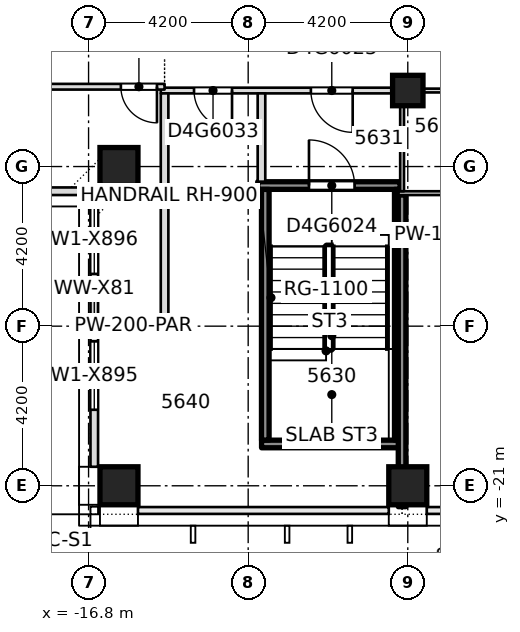
"""IFC4 building model, lengths in metres.
Left out: names, types, materials, properties, quantities, classifications, styles, units other than length and angle.
Written with IfcOpenShell. Run it as: python <this file> out.ifc"""

import sys

from ifc_helpers import new_model, si_unit, direction, frame, frame_2d, origin, origin_2d, place, context, subcontext, project, spatial, rectangle, extrude, element, fill, save


model = new_model("IFC4")
c1 = context("Model", 3, precision=1e-05, world=origin(), true_north=direction((0.0, 1.0)))
c2 = subcontext(c1, "Body", "Model", "MODEL_VIEW")
j1 = project(units=[si_unit("LENGTHUNIT", "METRE"), si_unit("PLANEANGLEUNIT", "RADIAN")], contexts=[c1])
p1 = place(None, origin())
s1 = spatial("IfcSite", under=j1, at=p1, CompositionType="ELEMENT")
p2 = place(p1, origin())
s2 = spatial("IfcBuilding", under=s1, at=p2, CompositionType="ELEMENT")
p3 = place(p2, frame((0.0, 0.0, 213.5)))
s3 = spatial("IfcBuildingStorey", under=s2, at=p3, CompositionType="ELEMENT", Elevation=213.5)
for number, where, z_axis, x_axis in (
    (1, (-16.0, -21.0, -0.4), (0.0, 0.0, 1.0), (1.0, 0.0, 0.0)),
    (2, (-8.4, -21.0, -0.4), (0.0, 0.0, 1.0), (1.0, 0.0, 0.0)),
    (3, (-16.0, -12.6, -0.4), (0.0, 0.0, 1.0), (1.0, 0.0, 0.0)),
):
    element("IfcColumn", number, at=place(p3, frame(where, z_axis=z_axis, x_axis=x_axis)), inside=s3, PredefinedType="COLUMN", context=c2, shape_type="SweptSolid", body=[
        extrude(rectangle(XDim=1.0, YDim=1.0, at=origin_2d()), origin(), (0.0, 0.0, 1.0), 3.85),
    ])
p4 = place(p3, frame((-8.4, -10.6, -0.4), z_axis=(0.0, 0.0, 1.0), x_axis=(1.0, 0.0, 0.0)))
e4 = element("IfcColumn", 4, at=p4, inside=s3, PredefinedType="COLUMN", context=c2, shape_type="SweptSolid", body=[
    extrude(rectangle(XDim=0.8, YDim=0.8, at=origin_2d()), origin(), (0.0, 0.0, 1.0), 3.85),
])
p5 = place(p3, frame((-12.248, -19.9, 0.0), z_axis=(0.0, 0.0, 1.0), x_axis=(1.0, 0.0, 0.0)))
e5 = element("IfcWall", 5, at=p5, inside=s3, PredefinedType="SOLIDWALL", context=c2, shape_type="SweptSolid", body=[
    extrude(rectangle(XDim=3.696, YDim=0.2, at=frame_2d((1.848, 0.0))), origin(), (0.0, 0.0, 1.0), 3.0),
])
p6 = place(p3, frame((-16.55, -16.8, 0.0), z_axis=(0.0, 0.0, 1.0), x_axis=(1.0, 0.0, 0.0)))
e6 = element("IfcWall", 6, at=p6, inside=s3, PredefinedType="PARTITIONING", context=c2, shape_type="SweptSolid", body=[
    extrude(rectangle(XDim=1.848, YDim=0.2, at=frame_2d((0.924, 0.0))), origin(), (0.0, 0.0, 1.0), 3.0),
])
p7 = place(p3, frame((-8.65, -13.3, 0.0), z_axis=(0.0, 0.0, 1.0), x_axis=(1.0, 0.0, 0.0)))
e7 = element("IfcWall", 7, at=p7, inside=s3, PredefinedType="PARTITIONING", context=c2, shape_type="SweptSolid", body=[
    extrude(rectangle(XDim=2.848, YDim=0.1, at=frame_2d((1.424, 0.0))), origin(), (0.0, 0.0, 1.0), 3.0),
])
p8 = place(p7, frame((1.75, 0.0, 0.0)))
e8 = element("IfcOpeningElement", 8, at=p8, cuts=e7, PredefinedType="OPENING", context=c2, shape_type="SweptSolid", body=[
    extrude(rectangle(XDim=0.85, YDim=2.1, at=frame_2d((0.425, 1.05))), frame((0.0, 0.06, 0.0), z_axis=(0.0, -1.0, 0.0), x_axis=(1.0, 0.0, 0.0)), (0.0, 0.0, 1.0), 0.12),
])
p9 = place(p3, frame((-12.348, -13.1, 0.0), z_axis=(0.0, 0.0, 1.0), x_axis=(1.0, 0.0, 0.0)))
e9 = element("IfcWall", 9, at=p9, inside=s3, PredefinedType="SOLIDWALL", context=c2, shape_type="SweptSolid", body=[
    extrude(rectangle(XDim=3.746, YDim=0.2, at=frame_2d((1.873, 0.0))), origin(), (0.0, 0.0, 1.0), 3.0),
])
p10 = place(p9, frame((1.348, 0.0, 0.0)))
e10 = element("IfcOpeningElement", 10, at=p10, cuts=e9, PredefinedType="OPENING", context=c2, shape_type="SweptSolid", body=[
    extrude(rectangle(XDim=1.2, YDim=2.1, at=frame_2d((0.6, 1.05))), frame((0.0, 0.11, 0.0), z_axis=(0.0, -1.0, 0.0), x_axis=(1.0, 0.0, 0.0)), (0.0, 0.0, 1.0), 0.22),
])
p11 = place(p3, frame((-14.9, -10.6, 0.0), z_axis=(0.0, 0.0, 1.0), x_axis=(1.0, 0.0, 0.0)))
e11 = element("IfcWall", 11, at=p11, inside=s3, PredefinedType="PARTITIONING", context=c2, shape_type="SweptSolid", body=[
    extrude(rectangle(XDim=6.4, YDim=0.15, at=frame_2d((3.2, 0.0))), origin(), (0.0, 0.0, 1.0), 3.0),
])
p12 = place(p11, frame((3.95, 0.0, 0.0)))
e12 = element("IfcOpeningElement", 12, at=p12, cuts=e11, PredefinedType="OPENING", context=c2, shape_type="SweptSolid", body=[
    extrude(rectangle(XDim=1.1, YDim=2.1, at=frame_2d((0.55, 1.05))), frame((0.0, 0.085, 0.0), z_axis=(0.0, -1.0, 0.0), x_axis=(1.0, 0.0, 0.0)), (0.0, 0.0, 1.0), 0.17),
])
p13 = place(p11, frame((0.875, 0.0, 0.0)))
e13 = element("IfcOpeningElement", 13, at=p13, cuts=e11, PredefinedType="OPENING", context=c2, shape_type="SweptSolid", body=[
    extrude(rectangle(XDim=1.0, YDim=2.1, at=frame_2d((0.5, 1.05))), frame((0.0, 0.085, 0.0), z_axis=(0.0, -1.0, 0.0), x_axis=(1.0, 0.0, 0.0)), (0.0, 0.0, 1.0), 0.17),
])
p14 = place(p3, frame((-8.6, -10.6, 0.0), z_axis=(0.0, 0.0, 1.0), x_axis=(1.0, 0.0, 0.0)))
e14 = element("IfcWall", 14, at=p14, inside=s3, PredefinedType="PARTITIONING", context=c2, shape_type="SweptSolid", body=[
    extrude(rectangle(XDim=2.8, YDim=0.1, at=frame_2d((1.4, 0.0))), origin(), (0.0, 0.0, 1.0), 3.0),
])
p15 = place(p3, frame((-25.75, -10.5, 0.0), z_axis=(0.0, 0.0, 1.0), x_axis=(1.0, 0.0, 0.0)))
e15 = element("IfcWall", 15, at=p15, inside=s3, PredefinedType="PARTITIONING", context=c2, shape_type="SweptSolid", body=[
    extrude(rectangle(XDim=10.95, YDim=0.15, at=frame_2d((5.475, 0.0))), origin(), (0.0, 0.0, 1.0), 3.0),
])
p16 = place(p15, frame((9.8, 0.0, 0.0)))
e16 = element("IfcOpeningElement", 16, at=p16, cuts=e15, PredefinedType="OPENING", context=c2, shape_type="SweptSolid", body=[
    extrude(rectangle(XDim=0.95, YDim=2.1, at=frame_2d((0.475, 1.05))), frame((0.0, 0.085, 0.0), z_axis=(0.0, -1.0, 0.0), x_axis=(1.0, 0.0, 0.0)), (0.0, 0.0, 1.0), 0.17),
])
p17 = place(p3, frame((-14.8, -16.698, 0.0), z_axis=(0.0, 0.0, 1.0), x_axis=(0.0, 1.0, 0.0)))
e17 = element("IfcWall", 17, at=p17, inside=s3, PredefinedType="PARTITIONING", context=c2, shape_type="SweptSolid", body=[
    extrude(rectangle(XDim=6.023, YDim=0.2, at=frame_2d((3.011, 0.0))), origin(), (0.0, 0.0, 1.0), 3.0),
])
p18 = place(p3, frame((-12.25, -12.998, 0.0), z_axis=(0.0, 0.0, 1.0), x_axis=(0.0, 1.0, 0.0)))
e18 = element("IfcWall", 18, at=p18, inside=s3, PredefinedType="PARTITIONING", context=c2, shape_type="SweptSolid", body=[
    extrude(rectangle(XDim=2.323, YDim=0.2, at=frame_2d((1.162, 0.0))), origin(), (0.0, 0.0, 1.0), 3.0),
])
for number, where, z_axis, x_axis in (
    (19, (-12.15, -19.798, 0.0), (0.0, 0.0, 1.0), (0.0, 1.0, 0.0)),
    (20, (-8.65, -19.798, 0.0), (0.0, 0.0, 1.0), (0.0, 1.0, 0.0)),
):
    element("IfcWall", number, at=place(p3, frame(where, z_axis=z_axis, x_axis=x_axis)), inside=s3, PredefinedType="SOLIDWALL", context=c2, shape_type="SweptSolid", body=[
        extrude(rectangle(XDim=6.596, YDim=0.2, at=frame_2d((3.298, 0.0))), origin(), (0.0, 0.0, 1.0), 3.0),
    ])
p19 = place(p3, frame((-8.55, -13.25, 0.0), z_axis=(0.0, 0.0, 1.0), x_axis=(0.0, 1.0, 0.0)))
e21 = element("IfcWall", 21, at=p19, inside=s3, PredefinedType="PARTITIONING", context=c2, shape_type="SweptSolid", body=[
    extrude(rectangle(XDim=2.575, YDim=0.1, at=frame_2d((1.288, 0.0))), origin(), (0.0, 0.0, 1.0), 3.0),
])
p20 = place(p3, frame((-24.7, -13.25, 0.0), z_axis=(0.0, 0.0, 1.0), x_axis=(1.0, 0.0, 0.0)))
e22 = element("IfcWall", 22, at=p20, inside=s3, PredefinedType="STANDARD", context=c2, shape_type="SweptSolid", body=[
    extrude(rectangle(XDim=7.95, YDim=0.2, at=frame_2d((3.975, 0.0))), origin(), (0.0, 0.0, 1.0), 3.0),
])
p21 = place(p3, frame((-16.65, -13.35, 0.0), z_axis=(0.0, 0.0, 1.0), x_axis=(0.0, -1.0, 0.0)))
e23 = element("IfcWall", 23, at=p21, inside=s3, PredefinedType="STANDARD", context=c2, shape_type="SweptSolid", body=[
    extrude(rectangle(XDim=7.15, YDim=0.2, at=frame_2d((3.575, 0.0))), origin(), (0.0, 0.0, 1.0), 3.0),
])
p22 = place(p21, frame((3.85, 0.0, 0.2)))
e24 = element("IfcOpeningElement", 24, at=p22, cuts=e23, PredefinedType="OPENING", context=c2, shape_type="SweptSolid", body=[
    extrude(rectangle(XDim=1.8, YDim=2.65, at=frame_2d((0.9, 1.325))), frame((0.0, 0.11, 0.0), z_axis=(0.0, -1.0, 0.0), x_axis=(1.0, 0.0, 0.0)), (0.0, 0.0, 1.0), 0.22),
])
p23 = place(p21, frame((0.275, 0.0, 0.2)))
e25 = element("IfcOpeningElement", 25, at=p23, cuts=e23, PredefinedType="OPENING", context=c2, shape_type="SweptSolid", body=[
    extrude(rectangle(XDim=1.8, YDim=2.65, at=frame_2d((0.9, 1.325))), frame((0.0, 0.11, 0.0), z_axis=(0.0, -1.0, 0.0), x_axis=(1.0, 0.0, 0.0)), (0.0, 0.0, 1.0), 0.22),
])
p24 = place(p3, frame((-8.55, -21.55, 0.0), z_axis=(0.0, 0.0, 1.0), x_axis=(0.0, 1.0, 0.0)))
e26 = element("IfcWall", 26, at=p24, inside=s3, PredefinedType="SOLIDWALL", context=c2, shape_type="SweptSolid", body=[
    extrude(rectangle(XDim=8.2, YDim=0.2, at=frame_2d((4.1, 0.0))), origin(), (0.0, 0.0, 1.0), 3.0),
])
p25 = place(p16, origin())
e27 = element("IfcDoor", 27, at=p25, inside=s3, OperationType="SINGLE_SWING_RIGHT", PredefinedType="DOOR", context=c2, shape_type="SweptSolid", body=[
    extrude(rectangle(XDim=0.95, YDim=2.1, at=frame_2d((0.475, 1.05))), frame((0.0, 0.025, 0.0), z_axis=(0.0, -1.0, 0.0), x_axis=(1.0, 0.0, 0.0)), (0.0, 0.0, 1.0), 0.05),
])
fill(e16, e27)
p26 = place(p12, origin())
e28 = element("IfcDoor", 28, at=p26, inside=s3, OperationType="SINGLE_SWING_RIGHT", PredefinedType="DOOR", context=c2, shape_type="SweptSolid", body=[
    extrude(rectangle(XDim=1.1, YDim=2.1, at=frame_2d((0.55, 1.05))), frame((0.0, 0.025, 0.0), z_axis=(0.0, -1.0, 0.0), x_axis=(1.0, 0.0, 0.0)), (0.0, 0.0, 1.0), 0.05),
])
fill(e12, e28)
p27 = place(p10, origin())
e29 = element("IfcDoor", 29, at=p27, inside=s3, OperationType="SINGLE_SWING_RIGHT", PredefinedType="DOOR", context=c2, shape_type="SweptSolid", body=[
    extrude(rectangle(XDim=1.2, YDim=2.1, at=frame_2d((0.6, 1.05))), frame((0.0, 0.025, 0.0), z_axis=(0.0, -1.0, 0.0), x_axis=(1.0, 0.0, 0.0)), (0.0, 0.0, 1.0), 0.05),
])
fill(e10, e29)
p28 = place(p13, origin())
e30 = element("IfcDoor", 30, at=p28, inside=s3, OperationType="SINGLE_SWING_RIGHT", PredefinedType="DOOR", context=c2, shape_type="SweptSolid", body=[
    extrude(rectangle(XDim=1.0, YDim=2.1, at=frame_2d((0.5, 1.05))), frame((0.0, 0.025, 0.0), z_axis=(0.0, -1.0, 0.0), x_axis=(1.0, 0.0, 0.0)), (0.0, 0.0, 1.0), 0.05),
])
fill(e13, e30)
p29 = place(p22, origin())
e31 = element("IfcWindow", 31, at=p29, inside=s3, PartitioningType="SINGLE_PANEL", PredefinedType="WINDOW", context=c2, shape_type="SweptSolid", body=[
    extrude(rectangle(XDim=1.8, YDim=2.65, at=frame_2d((0.9, 1.325))), frame((0.0, 0.03, 0.0), z_axis=(0.0, -1.0, 0.0), x_axis=(1.0, 0.0, 0.0)), (0.0, 0.0, 1.0), 0.06),
])
fill(e24, e31)
p30 = place(p23, origin())
e32 = element("IfcWindow", 32, at=p30, inside=s3, PartitioningType="SINGLE_PANEL", PredefinedType="WINDOW", context=c2, shape_type="SweptSolid", body=[
    extrude(rectangle(XDim=1.8, YDim=2.65, at=frame_2d((0.9, 1.325))), frame((0.0, 0.03, 0.0), z_axis=(0.0, -1.0, 0.0), x_axis=(1.0, 0.0, 0.0)), (0.0, 0.0, 1.0), 0.06),
])
fill(e25, e32)
save(model, sys.argv[1])
